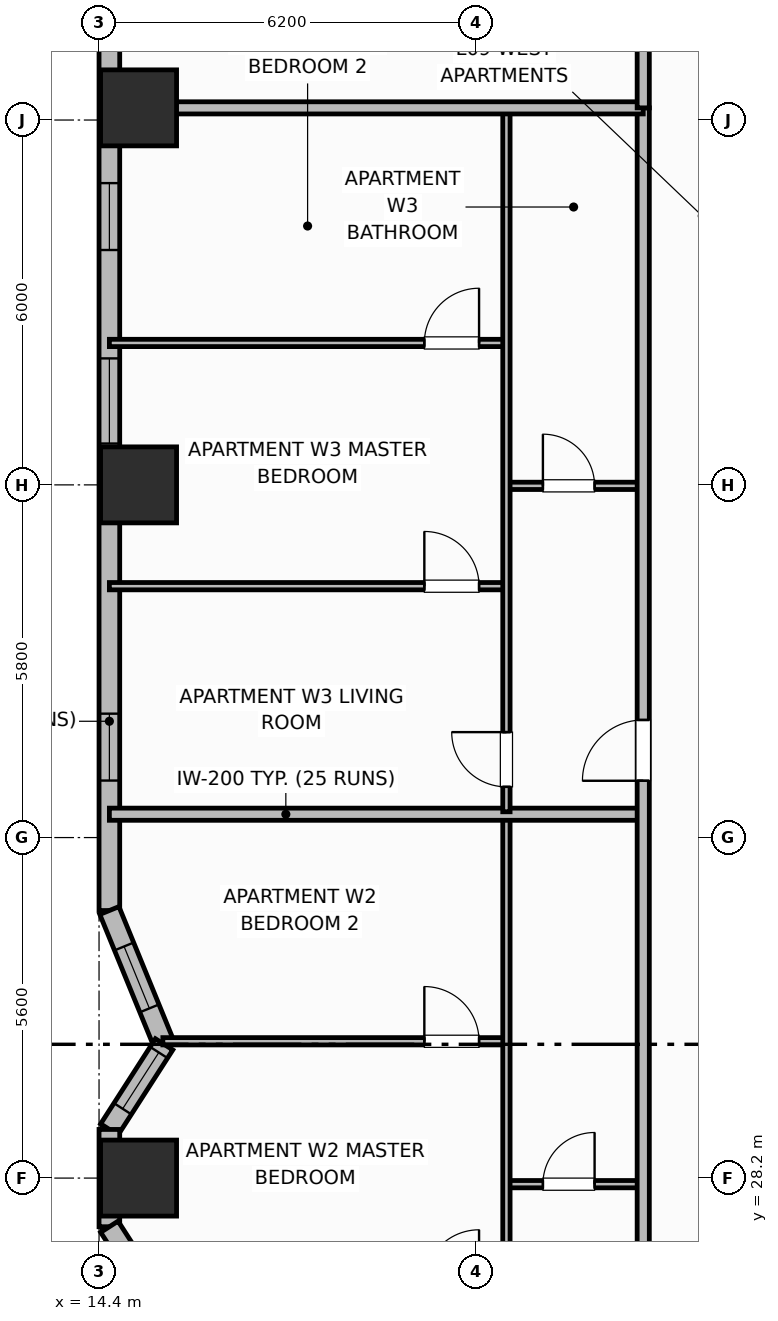
"""IFC4 building model, lengths in metres.
Left out: names, types, materials, properties, quantities, classifications, styles, units other than length and angle.
Written with IfcOpenShell. Run it as: python <this file> out.ifc"""

import sys

from ifc_helpers import new_model, si_unit, direction, frame, frame_2d, origin, origin_2d, place, context, subcontext, project, spatial, rectangle, extrude, element, fill, save


model = new_model("IFC4")
c1 = context("Model", 3, precision=1e-05, world=origin(), true_north=direction((0.0, 1.0)))
c2 = subcontext(c1, "Body", "Model", "MODEL_VIEW")
j1 = project(units=[si_unit("LENGTHUNIT", "METRE"), si_unit("PLANEANGLEUNIT", "RADIAN")], contexts=[c1])
p1 = place(None, origin())
s1 = spatial("IfcSite", under=j1, at=p1, CompositionType="ELEMENT")
p2 = place(p1, origin())
s2 = spatial("IfcBuilding", under=s1, at=p2, CompositionType="ELEMENT")
p3 = place(p2, frame((0.0, 0.0, 39.9)))
s3 = spatial("IfcBuildingStorey", under=s2, at=p3, CompositionType="ELEMENT", Elevation=39.9)
for number, where, z_axis, x_axis in (
    (1, (15.05, 28.2, 0.0), (0.0, 0.0, 1.0), (1.0, 0.0, 0.0)),
    (2, (15.05, 39.6, 0.0), (0.0, 0.0, 1.0), (1.0, 0.0, 0.0)),
    (3, (15.05, 45.8, 0.0), (0.0, 0.0, 1.0), (1.0, 0.0, 0.0)),
):
    element("IfcColumn", number, at=place(p3, frame(where, z_axis=z_axis, x_axis=x_axis)), inside=s3, PredefinedType="COLUMN", context=c2, shape_type="SweptSolid", body=[
        extrude(rectangle(XDim=1.25, YDim=1.25, at=origin_2d()), origin(), (0.0, 0.0, 1.0), 3.7),
    ])
p4 = place(p3, frame((14.57, 47.4, 0.0), z_axis=(0.0, 0.0, 1.0), x_axis=(0.0, -1.0, 0.0)))
e4 = element("IfcWall", 4, at=p4, inside=s3, PredefinedType="SOLIDWALL", context=c2, shape_type="SweptSolid", body=[
    extrude(rectangle(XDim=14.8, YDim=0.34, at=frame_2d((7.4, 0.0))), origin(), (0.0, 0.0, 1.0), 2.7),
])
p5 = place(p4, frame((2.837, 0.0, 0.93)))
e5 = element("IfcOpeningElement", 5, at=p5, cuts=e4, PredefinedType="OPENING", context=c2, shape_type="SweptSolid", body=[
    extrude(rectangle(XDim=1.1, YDim=1.65, at=frame_2d((0.55, 0.825))), frame((0.0, 0.18, 0.0), z_axis=(0.0, -1.0, 0.0), x_axis=(1.0, 0.0, 0.0)), (0.0, 0.0, 1.0), 0.36),
])
p6 = place(p4, frame((5.72, 0.0, 0.69)))
e6 = element("IfcOpeningElement", 6, at=p6, cuts=e4, PredefinedType="OPENING", context=c2, shape_type="SweptSolid", body=[
    extrude(rectangle(XDim=1.4, YDim=1.85, at=frame_2d((0.7, 0.925))), frame((0.0, 0.18, 0.0), z_axis=(0.0, -1.0, 0.0), x_axis=(1.0, 0.0, 0.0)), (0.0, 0.0, 1.0), 0.36),
])
p7 = place(p4, frame((11.562, 0.0, 0.93)))
e7 = element("IfcOpeningElement", 7, at=p7, cuts=e4, PredefinedType="OPENING", context=c2, shape_type="SweptSolid", body=[
    extrude(rectangle(XDim=1.1, YDim=1.65, at=frame_2d((0.55, 0.825))), frame((0.0, 0.18, 0.0), z_axis=(0.0, -1.0, 0.0), x_axis=(1.0, 0.0, 0.0)), (0.0, 0.0, 1.0), 0.36),
])
p8 = place(p3, frame((14.57, 32.6, 0.0), z_axis=(0.0, 0.0, 1.0), x_axis=(0.378568858991, -0.925573130013, 0.0)))
e8 = element("IfcWall", 8, at=p8, inside=s3, PredefinedType="SOLIDWALL", context=c2, shape_type="SweptSolid", body=[
    extrude(rectangle(XDim=2.377, YDim=0.34, at=frame_2d((1.188, 0.0))), origin(), (0.0, 0.0, 1.0), 2.7),
])
p9 = place(p8, frame((0.638, 0.0, 0.89)))
e9 = element("IfcOpeningElement", 9, at=p9, cuts=e8, PredefinedType="OPENING", context=c2, shape_type="SweptSolid", body=[
    extrude(rectangle(XDim=1.1, YDim=1.65, at=frame_2d((0.55, 0.825))), frame((0.0, 0.18, 0.0), z_axis=(0.0, -1.0, 0.0), x_axis=(1.0, 0.0, 0.0)), (0.0, 0.0, 1.0), 0.36),
])
p10 = place(p3, frame((15.47, 30.4, 0.0), z_axis=(0.0, 0.0, 1.0), x_axis=(-0.540742762169, -0.841188008214, 0.0)))
e10 = element("IfcWall", 10, at=p10, inside=s3, PredefinedType="SOLIDWALL", context=c2, shape_type="SweptSolid", body=[
    extrude(rectangle(XDim=1.664, YDim=0.34, at=frame_2d((0.832, 0.0))), origin(), (0.0, 0.0, 1.0), 2.7),
])
p11 = place(p10, frame((0.16, 0.0, 0.89)))
e11 = element("IfcOpeningElement", 11, at=p11, cuts=e10, PredefinedType="OPENING", context=c2, shape_type="SweptSolid", body=[
    extrude(rectangle(XDim=1.1, YDim=1.65, at=frame_2d((0.55, 0.825))), frame((0.0, 0.18, 0.0), z_axis=(0.0, -1.0, 0.0), x_axis=(1.0, 0.0, 0.0)), (0.0, 0.0, 1.0), 0.36),
])
p12 = place(p3, frame((14.57, 29.0, 0.0), z_axis=(0.0, 0.0, 1.0), x_axis=(0.0, -1.0, 0.0)))
e12 = element("IfcWall", 12, at=p12, inside=s3, PredefinedType="SOLIDWALL", context=c2, shape_type="SweptSolid", body=[
    extrude(rectangle(XDim=1.6, YDim=0.34, at=frame_2d((0.8, 0.0))), origin(), (0.0, 0.0, 1.0), 2.7),
])
p13 = place(p3, frame((14.57, 27.4, 0.0), z_axis=(0.0, 0.0, 1.0), x_axis=(0.540742762169, -0.841188008214, 0.0)))
e13 = element("IfcWall", 13, at=p13, inside=s3, PredefinedType="SOLIDWALL", context=c2, shape_type="SweptSolid", body=[
    extrude(rectangle(XDim=1.664, YDim=0.34, at=frame_2d((0.832, 0.0))), origin(), (0.0, 0.0, 1.0), 2.7),
])
p14 = place(p3, frame((21.1, 28.1, 0.0), z_axis=(0.0, 0.0, 1.0), x_axis=(1.0, 0.0, 0.0)))
e14 = element("IfcWall", 14, at=p14, inside=s3, PredefinedType="PARTITIONING", context=c2, shape_type="SweptSolid", body=[
    extrude(rectangle(XDim=2.25, YDim=0.12, at=frame_2d((1.125, 0.0))), origin(), (0.0, 0.0, 1.0), 2.53),
])
p15 = place(p14, frame((0.6, 0.0, 0.0)))
e15 = element("IfcOpeningElement", 15, at=p15, cuts=e14, PredefinedType="OPENING", context=c2, shape_type="SweptSolid", body=[
    extrude(rectangle(XDim=0.85, YDim=2.1, at=frame_2d((0.425, 1.05))), frame((0.0, 0.07, 0.0), z_axis=(0.0, -1.0, 0.0), x_axis=(1.0, 0.0, 0.0)), (0.0, 0.0, 1.0), 0.14),
])
p16 = place(p3, frame((15.449, 30.45, 0.0), z_axis=(0.0, 0.0, 1.0), x_axis=(1.0, 0.0, 0.0)))
e16 = element("IfcWall", 16, at=p16, inside=s3, PredefinedType="PARTITIONING", context=c2, shape_type="SweptSolid", body=[
    extrude(rectangle(XDim=5.651, YDim=0.12, at=frame_2d((2.825, 0.0))), origin(), (0.0, 0.0, 1.0), 2.53),
])
p17 = place(p16, frame((4.301, 0.0, 0.0)))
e17 = element("IfcOpeningElement", 17, at=p17, cuts=e16, PredefinedType="OPENING", context=c2, shape_type="SweptSolid", body=[
    extrude(rectangle(XDim=0.9, YDim=2.1, at=frame_2d((0.45, 1.05))), frame((0.0, 0.07, 0.0), z_axis=(0.0, -1.0, 0.0), x_axis=(1.0, 0.0, 0.0)), (0.0, 0.0, 1.0), 0.14),
])
p18 = place(p3, frame((21.1, 22.74, 0.0), z_axis=(0.0, 0.0, 1.0), x_axis=(0.0, 1.0, 0.0)))
e18 = element("IfcWall", 18, at=p18, inside=s3, PredefinedType="PARTITIONING", context=c2, shape_type="SweptSolid", body=[
    extrude(rectangle(XDim=11.404, YDim=0.12, at=frame_2d((5.702, 0.0))), origin(), (0.0, 0.0, 1.0), 2.53),
])
p19 = place(p18, frame((0.41, 0.0, 0.0)))
e19 = element("IfcOpeningElement", 19, at=p19, cuts=e18, PredefinedType="OPENING", context=c2, shape_type="SweptSolid", body=[
    extrude(rectangle(XDim=0.9, YDim=2.1, at=frame_2d((0.45, 1.05))), frame((0.0, 0.07, 0.0), z_axis=(0.0, -1.0, 0.0), x_axis=(1.0, 0.0, 0.0)), (0.0, 0.0, 1.0), 0.14),
])
p20 = place(p3, frame((14.57, 34.184, 0.0), z_axis=(0.0, 0.0, 1.0), x_axis=(1.0, 0.0, 0.0)))
e20 = element("IfcWall", 20, at=p20, inside=s3, PredefinedType="PARTITIONING", context=c2, shape_type="SweptSolid", body=[
    extrude(rectangle(XDim=8.78, YDim=0.2, at=frame_2d((4.39, 0.0))), origin(), (0.0, 0.0, 1.0), 2.53),
])
p21 = place(p3, frame((21.1, 39.584, 0.0), z_axis=(0.0, 0.0, 1.0), x_axis=(1.0, 0.0, 0.0)))
e21 = element("IfcWall", 21, at=p21, inside=s3, PredefinedType="PARTITIONING", context=c2, shape_type="SweptSolid", body=[
    extrude(rectangle(XDim=2.25, YDim=0.12, at=frame_2d((1.125, 0.0))), origin(), (0.0, 0.0, 1.0), 2.53),
])
p22 = place(p21, frame((0.6, 0.0, 0.0)))
e22 = element("IfcOpeningElement", 22, at=p22, cuts=e21, PredefinedType="OPENING", context=c2, shape_type="SweptSolid", body=[
    extrude(rectangle(XDim=0.85, YDim=2.1, at=frame_2d((0.425, 1.05))), frame((0.0, 0.07, 0.0), z_axis=(0.0, -1.0, 0.0), x_axis=(1.0, 0.0, 0.0)), (0.0, 0.0, 1.0), 0.14),
])
p23 = place(p3, frame((14.57, 37.934, 0.0), z_axis=(0.0, 0.0, 1.0), x_axis=(1.0, 0.0, 0.0)))
e23 = element("IfcWall", 23, at=p23, inside=s3, PredefinedType="PARTITIONING", context=c2, shape_type="SweptSolid", body=[
    extrude(rectangle(XDim=6.53, YDim=0.12, at=frame_2d((3.265, 0.0))), origin(), (0.0, 0.0, 1.0), 2.53),
])
p24 = place(p23, frame((5.18, 0.0, 0.0)))
e24 = element("IfcOpeningElement", 24, at=p24, cuts=e23, PredefinedType="OPENING", context=c2, shape_type="SweptSolid", body=[
    extrude(rectangle(XDim=0.9, YDim=2.1, at=frame_2d((0.45, 1.05))), frame((0.0, 0.07, 0.0), z_axis=(0.0, -1.0, 0.0), x_axis=(1.0, 0.0, 0.0)), (0.0, 0.0, 1.0), 0.14),
])
p25 = place(p3, frame((14.57, 41.934, 0.0), z_axis=(0.0, 0.0, 1.0), x_axis=(1.0, 0.0, 0.0)))
e25 = element("IfcWall", 25, at=p25, inside=s3, PredefinedType="PARTITIONING", context=c2, shape_type="SweptSolid", body=[
    extrude(rectangle(XDim=6.53, YDim=0.12, at=frame_2d((3.265, 0.0))), origin(), (0.0, 0.0, 1.0), 2.53),
])
p26 = place(p25, frame((5.18, 0.0, 0.0)))
e26 = element("IfcOpeningElement", 26, at=p26, cuts=e25, PredefinedType="OPENING", context=c2, shape_type="SweptSolid", body=[
    extrude(rectangle(XDim=0.9, YDim=2.1, at=frame_2d((0.45, 1.05))), frame((0.0, 0.07, 0.0), z_axis=(0.0, -1.0, 0.0), x_axis=(1.0, 0.0, 0.0)), (0.0, 0.0, 1.0), 0.14),
])
p27 = place(p3, frame((21.1, 34.224, 0.0), z_axis=(0.0, 0.0, 1.0), x_axis=(0.0, 1.0, 0.0)))
e27 = element("IfcWall", 27, at=p27, inside=s3, PredefinedType="PARTITIONING", context=c2, shape_type="SweptSolid", body=[
    extrude(rectangle(XDim=11.536, YDim=0.12, at=frame_2d((5.768, 0.0))), origin(), (0.0, 0.0, 1.0), 2.53),
])
p28 = place(p27, frame((0.41, 0.0, 0.0)))
e28 = element("IfcOpeningElement", 28, at=p28, cuts=e27, PredefinedType="OPENING", context=c2, shape_type="SweptSolid", body=[
    extrude(rectangle(XDim=0.9, YDim=2.1, at=frame_2d((0.45, 1.05))), frame((0.0, 0.07, 0.0), z_axis=(0.0, -1.0, 0.0), x_axis=(1.0, 0.0, 0.0)), (0.0, 0.0, 1.0), 0.14),
])
p29 = place(p3, frame((23.35, 10.6, 0.0), z_axis=(0.0, 0.0, 1.0), x_axis=(0.0, 1.0, 0.0)))
e29 = element("IfcWall", 29, at=p29, inside=s3, PredefinedType="PARTITIONING", context=c2, shape_type="SweptSolid", body=[
    extrude(rectangle(XDim=35.2, YDim=0.2, at=frame_2d((17.6, 0.0))), origin(), (0.0, 0.0, 1.0), 2.53),
])
p30 = place(p29, frame((2.65, 0.0, 0.0)))
e30 = element("IfcOpeningElement", 30, at=p30, cuts=e29, PredefinedType="OPENING", context=c2, shape_type="SweptSolid", body=[
    extrude(rectangle(XDim=1.0, YDim=2.15, at=frame_2d((0.5, 1.075))), frame((0.0, 0.11, 0.0), z_axis=(0.0, -1.0, 0.0), x_axis=(1.0, 0.0, 0.0)), (0.0, 0.0, 1.0), 0.22),
])
p31 = place(p29, frame((12.65, 0.0, 0.0)))
e31 = element("IfcOpeningElement", 31, at=p31, cuts=e29, PredefinedType="OPENING", context=c2, shape_type="SweptSolid", body=[
    extrude(rectangle(XDim=1.0, YDim=2.15, at=frame_2d((0.5, 1.075))), frame((0.0, 0.11, 0.0), z_axis=(0.0, -1.0, 0.0), x_axis=(1.0, 0.0, 0.0)), (0.0, 0.0, 1.0), 0.22),
])
p32 = place(p29, frame((24.134, 0.0, 0.0)))
e32 = element("IfcOpeningElement", 32, at=p32, cuts=e29, PredefinedType="OPENING", context=c2, shape_type="SweptSolid", body=[
    extrude(rectangle(XDim=1.0, YDim=2.15, at=frame_2d((0.5, 1.075))), frame((0.0, 0.11, 0.0), z_axis=(0.0, -1.0, 0.0), x_axis=(1.0, 0.0, 0.0)), (0.0, 0.0, 1.0), 0.22),
])
p33 = place(p3, frame((14.99, 45.8, 0.0), z_axis=(0.0, 0.0, 1.0), x_axis=(1.0, 0.0, 0.0)))
e33 = element("IfcWall", 33, at=p33, inside=s3, PredefinedType="PARTITIONING", context=c2, shape_type="SweptSolid", body=[
    extrude(rectangle(XDim=8.36, YDim=0.2, at=frame_2d((4.18, 0.0))), origin(), (0.0, 0.0, 1.0), 2.53),
])
p34 = place(p3, frame((23.35, 45.8, 0.0), z_axis=(0.0, 0.0, 1.0), x_axis=(0.0, 1.0, 0.0)))
e34 = element("IfcWall", 34, at=p34, inside=s3, PredefinedType="PARTITIONING", context=c2, shape_type="SweptSolid", body=[
    extrude(rectangle(XDim=5.63, YDim=0.2, at=frame_2d((2.815, 0.0))), origin(), (0.0, 0.0, 1.0), 2.53),
])
p35 = place(p5, origin())
e35 = element("IfcWindow", 35, at=p35, inside=s3, PartitioningType="SINGLE_PANEL", PredefinedType="WINDOW", context=c2, shape_type="SweptSolid", body=[
    extrude(rectangle(XDim=1.1, YDim=1.65, at=frame_2d((0.55, 0.825))), frame((0.0, 0.03, 0.0), z_axis=(0.0, -1.0, 0.0), x_axis=(1.0, 0.0, 0.0)), (0.0, 0.0, 1.0), 0.06),
])
fill(e5, e35)
p36 = place(p6, origin())
e36 = element("IfcWindow", 36, at=p36, inside=s3, PartitioningType="SINGLE_PANEL", PredefinedType="WINDOW", context=c2, shape_type="SweptSolid", body=[
    extrude(rectangle(XDim=1.4, YDim=1.85, at=frame_2d((0.7, 0.925))), frame((0.0, 0.03, 0.0), z_axis=(0.0, -1.0, 0.0), x_axis=(1.0, 0.0, 0.0)), (0.0, 0.0, 1.0), 0.06),
])
fill(e6, e36)
p37 = place(p7, origin())
e37 = element("IfcWindow", 37, at=p37, inside=s3, PartitioningType="SINGLE_PANEL", PredefinedType="WINDOW", context=c2, shape_type="SweptSolid", body=[
    extrude(rectangle(XDim=1.1, YDim=1.65, at=frame_2d((0.55, 0.825))), frame((0.0, 0.03, 0.0), z_axis=(0.0, -1.0, 0.0), x_axis=(1.0, 0.0, 0.0)), (0.0, 0.0, 1.0), 0.06),
])
fill(e7, e37)
p38 = place(p9, origin())
e38 = element("IfcWindow", 38, at=p38, inside=s3, PartitioningType="SINGLE_PANEL", PredefinedType="WINDOW", context=c2, shape_type="SweptSolid", body=[
    extrude(rectangle(XDim=1.1, YDim=1.65, at=frame_2d((0.55, 0.825))), frame((0.0, 0.03, 0.0), z_axis=(0.0, -1.0, 0.0), x_axis=(1.0, 0.0, 0.0)), (0.0, 0.0, 1.0), 0.06),
])
fill(e9, e38)
p39 = place(p11, origin())
e39 = element("IfcWindow", 39, at=p39, inside=s3, PartitioningType="SINGLE_PANEL", PredefinedType="WINDOW", context=c2, shape_type="SweptSolid", body=[
    extrude(rectangle(XDim=1.1, YDim=1.65, at=frame_2d((0.55, 0.825))), frame((0.0, 0.03, 0.0), z_axis=(0.0, -1.0, 0.0), x_axis=(1.0, 0.0, 0.0)), (0.0, 0.0, 1.0), 0.06),
])
fill(e11, e39)
p40 = place(p15, origin())
e40 = element("IfcDoor", 40, at=p40, inside=s3, OperationType="SINGLE_SWING_RIGHT", PredefinedType="DOOR", context=c2, shape_type="SweptSolid", body=[
    extrude(rectangle(XDim=0.85, YDim=2.1, at=frame_2d((0.425, 1.05))), frame((0.0, 0.025, 0.0), z_axis=(0.0, -1.0, 0.0), x_axis=(1.0, 0.0, 0.0)), (0.0, 0.0, 1.0), 0.05),
])
fill(e15, e40)
p41 = place(p17, origin())
e41 = element("IfcDoor", 41, at=p41, inside=s3, OperationType="SINGLE_SWING_LEFT", PredefinedType="DOOR", context=c2, shape_type="SweptSolid", body=[
    extrude(rectangle(XDim=0.9, YDim=2.1, at=frame_2d((0.45, 1.05))), frame((0.0, 0.025, 0.0), z_axis=(0.0, -1.0, 0.0), x_axis=(1.0, 0.0, 0.0)), (0.0, 0.0, 1.0), 0.05),
])
fill(e17, e41)
p42 = place(p22, origin())
e42 = element("IfcDoor", 42, at=p42, inside=s3, OperationType="SINGLE_SWING_LEFT", PredefinedType="DOOR", context=c2, shape_type="SweptSolid", body=[
    extrude(rectangle(XDim=0.85, YDim=2.1, at=frame_2d((0.425, 1.05))), frame((0.0, 0.025, 0.0), z_axis=(0.0, -1.0, 0.0), x_axis=(1.0, 0.0, 0.0)), (0.0, 0.0, 1.0), 0.05),
])
fill(e22, e42)
p43 = place(p24, origin())
e43 = element("IfcDoor", 43, at=p43, inside=s3, OperationType="SINGLE_SWING_LEFT", PredefinedType="DOOR", context=c2, shape_type="SweptSolid", body=[
    extrude(rectangle(XDim=0.9, YDim=2.1, at=frame_2d((0.45, 1.05))), frame((0.0, 0.025, 0.0), z_axis=(0.0, -1.0, 0.0), x_axis=(1.0, 0.0, 0.0)), (0.0, 0.0, 1.0), 0.05),
])
fill(e24, e43)
p44 = place(p26, origin())
e44 = element("IfcDoor", 44, at=p44, inside=s3, OperationType="SINGLE_SWING_RIGHT", PredefinedType="DOOR", context=c2, shape_type="SweptSolid", body=[
    extrude(rectangle(XDim=0.9, YDim=2.1, at=frame_2d((0.45, 1.05))), frame((0.0, 0.025, 0.0), z_axis=(0.0, -1.0, 0.0), x_axis=(1.0, 0.0, 0.0)), (0.0, 0.0, 1.0), 0.05),
])
fill(e26, e44)
p45 = place(p28, origin())
e45 = element("IfcDoor", 45, at=p45, inside=s3, OperationType="SINGLE_SWING_RIGHT", PredefinedType="DOOR", context=c2, shape_type="SweptSolid", body=[
    extrude(rectangle(XDim=0.9, YDim=2.1, at=frame_2d((0.45, 1.05))), frame((0.0, 0.025, 0.0), z_axis=(0.0, -1.0, 0.0), x_axis=(1.0, 0.0, 0.0)), (0.0, 0.0, 1.0), 0.05),
])
fill(e28, e45)
p46 = place(p32, origin())
e46 = element("IfcDoor", 46, at=p46, inside=s3, OperationType="SINGLE_SWING_LEFT", PredefinedType="DOOR", context=c2, shape_type="SweptSolid", body=[
    extrude(rectangle(XDim=1.0, YDim=2.15, at=frame_2d((0.5, 1.075))), frame((0.0, 0.025, 0.0), z_axis=(0.0, -1.0, 0.0), x_axis=(1.0, 0.0, 0.0)), (0.0, 0.0, 1.0), 0.05),
])
fill(e32, e46)
save(model, sys.argv[1])
